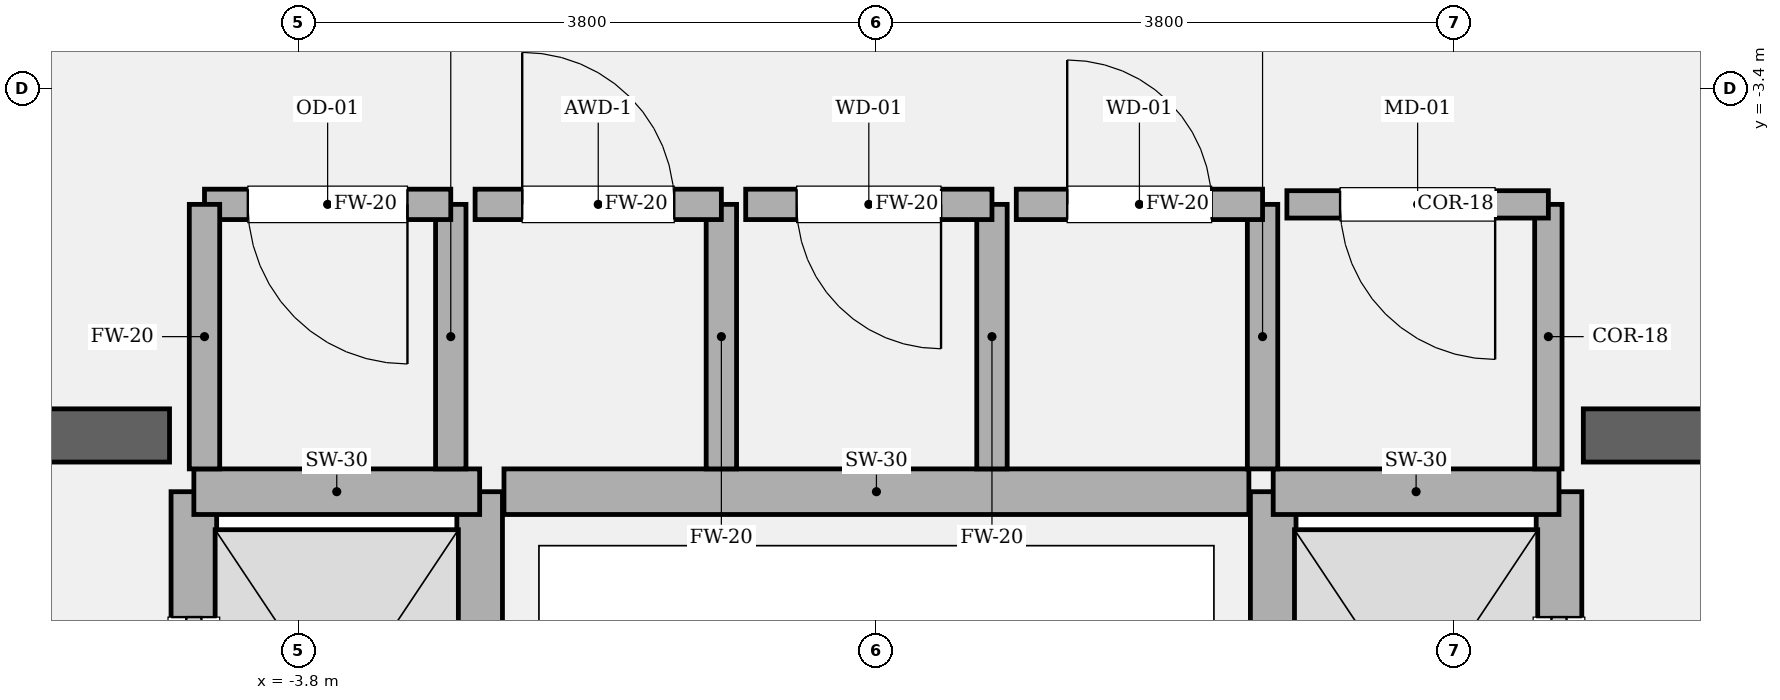
"""IFC4 building model, lengths in metres.
Left out: names, types, materials, properties, quantities, classifications, styles, units other than length and angle.
Written with IfcOpenShell. Run it as: python <this file> out.ifc"""

import sys

from ifc_helpers import new_model, si_unit, direction, frame, frame_2d, origin, place, context, subcontext, project, spatial, rectangle, extrude, element, fill, save


model = new_model("IFC4")
c1 = context("Model", 3, precision=1e-05, world=origin(), true_north=direction((0.0, 1.0)))
c2 = subcontext(c1, "Body", "Model", "MODEL_VIEW")
j1 = project(units=[si_unit("LENGTHUNIT", "METRE"), si_unit("PLANEANGLEUNIT", "RADIAN")], contexts=[c1])
p1 = place(None, origin())
s1 = spatial("IfcSite", under=j1, at=p1, CompositionType="ELEMENT")
p2 = place(p1, origin())
s2 = spatial("IfcBuilding", under=s1, at=p2, CompositionType="ELEMENT")
p3 = place(p2, frame((0.0, 0.0, 93.0)))
s3 = spatial("IfcBuildingStorey", under=s2, at=p3, CompositionType="ELEMENT", Elevation=93.0)
p4 = place(p3, frame((-9.825, -5.68, 0.0), z_axis=(0.0, 0.0, 1.0), x_axis=(1.0, 0.0, 0.0)))
e1 = element("IfcWall", 1, at=p4, inside=s3, PredefinedType="SOLIDWALL", context=c2, shape_type="SweptSolid", body=[
    extrude(rectangle(XDim=5.175, YDim=0.35, at=frame_2d((2.587, 0.0))), origin(), (0.0, 0.0, 1.0), 4.05),
])
p5 = place(p4, frame((1.285, 0.0, 0.0)))
e2 = element("IfcOpeningElement", 2, at=p5, cuts=e1, PredefinedType="OPENING", context=c2, shape_type="SweptSolid", body=[
    extrude(rectangle(XDim=1.18, YDim=2.2, at=frame_2d((0.59, 1.1))), frame((0.0, 0.185, 0.0), z_axis=(0.0, -1.0, 0.0), x_axis=(1.0, 0.0, 0.0)), (0.0, 0.0, 1.0), 0.37),
])
p6 = place(p3, frame((4.65, -5.68, 0.0), z_axis=(0.0, 0.0, 1.0), x_axis=(1.0, 0.0, 0.0)))
e3 = element("IfcWall", 3, at=p6, inside=s3, PredefinedType="SOLIDWALL", context=c2, shape_type="SweptSolid", body=[
    extrude(rectangle(XDim=5.175, YDim=0.35, at=frame_2d((2.587, 0.0))), origin(), (0.0, 0.0, 1.0), 4.05),
])
p7 = place(p6, frame((2.71, 0.0, 0.0)))
e4 = element("IfcOpeningElement", 4, at=p7, cuts=e3, PredefinedType="OPENING", context=c2, shape_type="SweptSolid", body=[
    extrude(rectangle(XDim=1.18, YDim=2.2, at=frame_2d((0.59, 1.1))), frame((0.0, 0.185, 0.0), z_axis=(0.0, -1.0, 0.0), x_axis=(1.0, 0.0, 0.0)), (0.0, 0.0, 1.0), 0.37),
])
p8 = place(p3, frame((-4.49, -8.82, 0.0), z_axis=(0.0, 0.0, 1.0), x_axis=(0.0, 1.0, 0.0)))
e5 = element("IfcWall", 5, at=p8, inside=s3, PredefinedType="SOLIDWALL", context=c2, shape_type="SweptSolid", body=[
    extrude(rectangle(XDim=2.77, YDim=0.3, at=frame_2d((1.385, 0.0))), origin(), (0.0, 0.0, 1.0), 3.81),
])
p9 = place(p8, frame((0.825, 0.0, 0.0)))
e6 = element("IfcOpeningElement", 6, at=p9, cuts=e5, PredefinedType="OPENING", context=c2, shape_type="SweptSolid", body=[
    extrude(rectangle(XDim=1.12, YDim=2.25, at=frame_2d((0.56, 1.125))), frame((0.0, 0.16, 0.0), z_axis=(0.0, -1.0, 0.0), x_axis=(1.0, 0.0, 0.0)), (0.0, 0.0, 1.0), 0.32),
])
p10 = place(p3, frame((-2.61, -8.82, 0.0), z_axis=(0.0, 0.0, 1.0), x_axis=(0.0, 1.0, 0.0)))
e7 = element("IfcWall", 7, at=p10, inside=s3, PredefinedType="SOLIDWALL", context=c2, shape_type="SweptSolid", body=[
    extrude(rectangle(XDim=2.77, YDim=0.3, at=frame_2d((1.385, 0.0))), origin(), (0.0, 0.0, 1.0), 3.81),
])
p11 = place(p3, frame((-4.49, -6.05, 0.0), z_axis=(0.0, 0.0, 1.0), x_axis=(1.0, 0.0, 0.0)))
e8 = element("IfcWall", 8, at=p11, inside=s3, PredefinedType="SOLIDWALL", context=c2, shape_type="SweptSolid", body=[
    extrude(rectangle(XDim=1.88, YDim=0.3, at=frame_2d((0.94, 0.0))), origin(), (0.0, 0.0, 1.0), 3.81),
])
p12 = place(p3, frame((4.49, -8.82, 0.0), z_axis=(0.0, 0.0, 1.0), x_axis=(0.0, 1.0, 0.0)))
e9 = element("IfcWall", 9, at=p12, inside=s3, PredefinedType="SOLIDWALL", context=c2, shape_type="SweptSolid", body=[
    extrude(rectangle(XDim=2.77, YDim=0.3, at=frame_2d((1.385, 0.0))), origin(), (0.0, 0.0, 1.0), 3.81),
])
p13 = place(p12, frame((0.825, 0.0, 0.0)))
e10 = element("IfcOpeningElement", 10, at=p13, cuts=e9, PredefinedType="OPENING", context=c2, shape_type="SweptSolid", body=[
    extrude(rectangle(XDim=1.12, YDim=2.25, at=frame_2d((0.56, 1.125))), frame((0.0, 0.16, 0.0), z_axis=(0.0, -1.0, 0.0), x_axis=(1.0, 0.0, 0.0)), (0.0, 0.0, 1.0), 0.32),
])
p14 = place(p3, frame((2.61, -8.82, 0.0), z_axis=(0.0, 0.0, 1.0), x_axis=(0.0, 1.0, 0.0)))
e11 = element("IfcWall", 11, at=p14, inside=s3, PredefinedType="SOLIDWALL", context=c2, shape_type="SweptSolid", body=[
    extrude(rectangle(XDim=2.77, YDim=0.3, at=frame_2d((1.385, 0.0))), origin(), (0.0, 0.0, 1.0), 3.81),
])
p15 = place(p3, frame((2.61, -6.05, 0.0), z_axis=(0.0, 0.0, 1.0), x_axis=(1.0, 0.0, 0.0)))
e12 = element("IfcWall", 12, at=p15, inside=s3, PredefinedType="SOLIDWALL", context=c2, shape_type="SweptSolid", body=[
    extrude(rectangle(XDim=1.88, YDim=0.3, at=frame_2d((0.94, 0.0))), origin(), (0.0, 0.0, 1.0), 3.81),
])
p16 = place(p3, frame((-2.45, -6.05, 0.0), z_axis=(0.0, 0.0, 1.0), x_axis=(1.0, 0.0, 0.0)))
e13 = element("IfcWall", 13, at=p16, inside=s3, PredefinedType="SOLIDWALL", context=c2, shape_type="SweptSolid", body=[
    extrude(rectangle(XDim=4.9, YDim=0.3, at=frame_2d((2.45, 0.0))), origin(), (0.0, 0.0, 1.0), 3.81),
])
p17 = place(p3, frame((-2.8, -5.9, 0.0), z_axis=(0.0, 0.0, 1.0), x_axis=(0.0, 1.0, 0.0)))
e14 = element("IfcWall", 14, at=p17, inside=s3, PredefinedType="SOLIDWALL", context=c2, shape_type="SweptSolid", body=[
    extrude(rectangle(XDim=1.74, YDim=0.2, at=frame_2d((0.87, 0.0))), origin(), (0.0, 0.0, 1.0), 3.81),
])
p18 = place(p3, frame((-2.8, -4.16, 0.0), z_axis=(0.0, 0.0, 1.0), x_axis=(-1.0, 0.0, 0.0)))
e15 = element("IfcWall", 15, at=p18, inside=s3, PredefinedType="SOLIDWALL", context=c2, shape_type="SweptSolid", body=[
    extrude(rectangle(XDim=1.62, YDim=0.2, at=frame_2d((0.81, 0.0))), origin(), (0.0, 0.0, 1.0), 3.81),
])
p19 = place(p18, frame((0.285, 0.0, 0.0)))
e16 = element("IfcOpeningElement", 16, at=p19, cuts=e15, PredefinedType="OPENING", context=c2, shape_type="SweptSolid", body=[
    extrude(rectangle(XDim=1.05, YDim=2.2, at=frame_2d((0.525, 1.1))), frame((0.0, 0.11, 0.0), z_axis=(0.0, -1.0, 0.0), x_axis=(1.0, 0.0, 0.0)), (0.0, 0.0, 1.0), 0.22),
])
for number, where, z_axis, x_axis in (
    (17, (-4.42, -4.16, 0.0), (0.0, 0.0, 1.0), (0.0, -1.0, 0.0)),
    (18, (-1.02, -5.9, 0.0), (0.0, 0.0, 1.0), (0.0, 1.0, 0.0)),
):
    element("IfcWall", number, at=place(p3, frame(where, z_axis=z_axis, x_axis=x_axis)), inside=s3, PredefinedType="SOLIDWALL", context=c2, shape_type="SweptSolid", body=[
        extrude(rectangle(XDim=1.74, YDim=0.2, at=frame_2d((0.87, 0.0))), origin(), (0.0, 0.0, 1.0), 3.81),
    ])
p20 = place(p3, frame((-1.02, -4.16, 0.0), z_axis=(0.0, 0.0, 1.0), x_axis=(-1.0, 0.0, 0.0)))
e19 = element("IfcWall", 19, at=p20, inside=s3, PredefinedType="SOLIDWALL", context=c2, shape_type="SweptSolid", body=[
    extrude(rectangle(XDim=1.62, YDim=0.2, at=frame_2d((0.81, 0.0))), origin(), (0.0, 0.0, 1.0), 3.81),
])
p21 = place(p20, frame((0.31, 0.0, 0.0)))
e20 = element("IfcOpeningElement", 20, at=p21, cuts=e19, PredefinedType="OPENING", context=c2, shape_type="SweptSolid", body=[
    extrude(rectangle(XDim=1.0, YDim=2.15, at=frame_2d((0.5, 1.075))), frame((0.0, 0.11, 0.0), z_axis=(0.0, -1.0, 0.0), x_axis=(1.0, 0.0, 0.0)), (0.0, 0.0, 1.0), 0.22),
])
p22 = place(p3, frame((0.76, -5.9, 0.0), z_axis=(0.0, 0.0, 1.0), x_axis=(0.0, 1.0, 0.0)))
e21 = element("IfcWall", 21, at=p22, inside=s3, PredefinedType="SOLIDWALL", context=c2, shape_type="SweptSolid", body=[
    extrude(rectangle(XDim=1.74, YDim=0.2, at=frame_2d((0.87, 0.0))), origin(), (0.0, 0.0, 1.0), 3.81),
])
p23 = place(p3, frame((0.76, -4.16, 0.0), z_axis=(0.0, 0.0, 1.0), x_axis=(-1.0, 0.0, 0.0)))
e22 = element("IfcWall", 22, at=p23, inside=s3, PredefinedType="SOLIDWALL", context=c2, shape_type="SweptSolid", body=[
    extrude(rectangle(XDim=1.62, YDim=0.2, at=frame_2d((0.81, 0.0))), origin(), (0.0, 0.0, 1.0), 3.81),
])
p24 = place(p23, frame((0.335, 0.0, 0.0)))
e23 = element("IfcOpeningElement", 23, at=p24, cuts=e22, PredefinedType="OPENING", context=c2, shape_type="SweptSolid", body=[
    extrude(rectangle(XDim=0.95, YDim=2.15, at=frame_2d((0.475, 1.075))), frame((0.0, 0.11, 0.0), z_axis=(0.0, -1.0, 0.0), x_axis=(1.0, 0.0, 0.0)), (0.0, 0.0, 1.0), 0.22),
])
p25 = place(p3, frame((2.54, -5.9, 0.0), z_axis=(0.0, 0.0, 1.0), x_axis=(0.0, 1.0, 0.0)))
e24 = element("IfcWall", 24, at=p25, inside=s3, PredefinedType="SOLIDWALL", context=c2, shape_type="SweptSolid", body=[
    extrude(rectangle(XDim=1.74, YDim=0.2, at=frame_2d((0.87, 0.0))), origin(), (0.0, 0.0, 1.0), 3.81),
])
p26 = place(p3, frame((2.54, -4.16, 0.0), z_axis=(0.0, 0.0, 1.0), x_axis=(-1.0, 0.0, 0.0)))
e25 = element("IfcWall", 25, at=p26, inside=s3, PredefinedType="SOLIDWALL", context=c2, shape_type="SweptSolid", body=[
    extrude(rectangle(XDim=1.62, YDim=0.2, at=frame_2d((0.81, 0.0))), origin(), (0.0, 0.0, 1.0), 3.81),
])
p27 = place(p26, frame((0.335, 0.0, 0.0)))
e26 = element("IfcOpeningElement", 26, at=p27, cuts=e25, PredefinedType="OPENING", context=c2, shape_type="SweptSolid", body=[
    extrude(rectangle(XDim=0.95, YDim=2.15, at=frame_2d((0.475, 1.075))), frame((0.0, 0.11, 0.0), z_axis=(0.0, -1.0, 0.0), x_axis=(1.0, 0.0, 0.0)), (0.0, 0.0, 1.0), 0.22),
])
p28 = place(p3, frame((4.42, -5.9, 0.0), z_axis=(0.0, 0.0, 1.0), x_axis=(0.0, 1.0, 0.0)))
e27 = element("IfcWall", 27, at=p28, inside=s3, PredefinedType="PARTITIONING", context=c2, shape_type="SweptSolid", body=[
    extrude(rectangle(XDim=1.74, YDim=0.18, at=frame_2d((0.87, 0.0))), origin(), (0.0, 0.0, 1.0), 3.81),
])
p29 = place(p3, frame((4.42, -4.16, 0.0), z_axis=(0.0, 0.0, 1.0), x_axis=(-1.0, 0.0, 0.0)))
e28 = element("IfcWall", 28, at=p29, inside=s3, PredefinedType="PARTITIONING", context=c2, shape_type="SweptSolid", body=[
    extrude(rectangle(XDim=1.72, YDim=0.18, at=frame_2d((0.86, 0.0))), origin(), (0.0, 0.0, 1.0), 3.81),
])
p30 = place(p29, frame((0.35, 0.0, 0.0)))
e29 = element("IfcOpeningElement", 29, at=p30, cuts=e28, PredefinedType="OPENING", context=c2, shape_type="SweptSolid", body=[
    extrude(rectangle(XDim=1.02, YDim=2.2, at=frame_2d((0.51, 1.1))), frame((0.0, 0.1, 0.0), z_axis=(0.0, -1.0, 0.0), x_axis=(1.0, 0.0, 0.0)), (0.0, 0.0, 1.0), 0.2),
])
p31 = place(p9, origin())
e30 = element("IfcDoor", 30, at=p31, inside=s3, OperationType="SLIDING_TO_LEFT", PredefinedType="DOOR", context=c2, shape_type="SweptSolid", body=[
    extrude(rectangle(XDim=1.12, YDim=2.25, at=frame_2d((0.56, 1.125))), frame((0.0, 0.025, 0.0), z_axis=(0.0, -1.0, 0.0), x_axis=(1.0, 0.0, 0.0)), (0.0, 0.0, 1.0), 0.05),
])
fill(e6, e30)
p32 = place(p13, origin())
e31 = element("IfcDoor", 31, at=p32, inside=s3, OperationType="SLIDING_TO_RIGHT", PredefinedType="DOOR", context=c2, shape_type="SweptSolid", body=[
    extrude(rectangle(XDim=1.12, YDim=2.25, at=frame_2d((0.56, 1.125))), frame((0.0, 0.025, 0.0), z_axis=(0.0, -1.0, 0.0), x_axis=(1.0, 0.0, 0.0)), (0.0, 0.0, 1.0), 0.05),
])
fill(e10, e31)
p33 = place(p19, origin())
e32 = element("IfcDoor", 32, at=p33, inside=s3, OperationType="SINGLE_SWING_LEFT", PredefinedType="DOOR", context=c2, shape_type="SweptSolid", body=[
    extrude(rectangle(XDim=1.05, YDim=2.2, at=frame_2d((0.525, 1.1))), frame((0.0, 0.025, 0.0), z_axis=(0.0, -1.0, 0.0), x_axis=(1.0, 0.0, 0.0)), (0.0, 0.0, 1.0), 0.05),
])
fill(e16, e32)
p34 = place(p21, origin())
e33 = element("IfcDoor", 33, at=p34, inside=s3, OperationType="SINGLE_SWING_RIGHT", PredefinedType="DOOR", context=c2, shape_type="SweptSolid", body=[
    extrude(rectangle(XDim=1.0, YDim=2.15, at=frame_2d((0.5, 1.075))), frame((0.0, 0.025, 0.0), z_axis=(0.0, -1.0, 0.0), x_axis=(1.0, 0.0, 0.0)), (0.0, 0.0, 1.0), 0.05),
])
fill(e20, e33)
p35 = place(p24, origin())
e34 = element("IfcDoor", 34, at=p35, inside=s3, OperationType="SINGLE_SWING_LEFT", PredefinedType="DOOR", context=c2, shape_type="SweptSolid", body=[
    extrude(rectangle(XDim=0.95, YDim=2.15, at=frame_2d((0.475, 1.075))), frame((0.0, 0.025, 0.0), z_axis=(0.0, -1.0, 0.0), x_axis=(1.0, 0.0, 0.0)), (0.0, 0.0, 1.0), 0.05),
])
fill(e23, e34)
p36 = place(p27, origin())
e35 = element("IfcDoor", 35, at=p36, inside=s3, OperationType="SINGLE_SWING_RIGHT", PredefinedType="DOOR", context=c2, shape_type="SweptSolid", body=[
    extrude(rectangle(XDim=0.95, YDim=2.15, at=frame_2d((0.475, 1.075))), frame((0.0, 0.025, 0.0), z_axis=(0.0, -1.0, 0.0), x_axis=(1.0, 0.0, 0.0)), (0.0, 0.0, 1.0), 0.05),
])
fill(e26, e35)
p37 = place(p30, origin())
e36 = element("IfcDoor", 36, at=p37, inside=s3, OperationType="SINGLE_SWING_LEFT", PredefinedType="DOOR", context=c2, shape_type="SweptSolid", body=[
    extrude(rectangle(XDim=1.02, YDim=2.2, at=frame_2d((0.51, 1.1))), frame((0.0, 0.025, 0.0), z_axis=(0.0, -1.0, 0.0), x_axis=(1.0, 0.0, 0.0)), (0.0, 0.0, 1.0), 0.05),
])
fill(e29, e36)
save(model, sys.argv[1])
